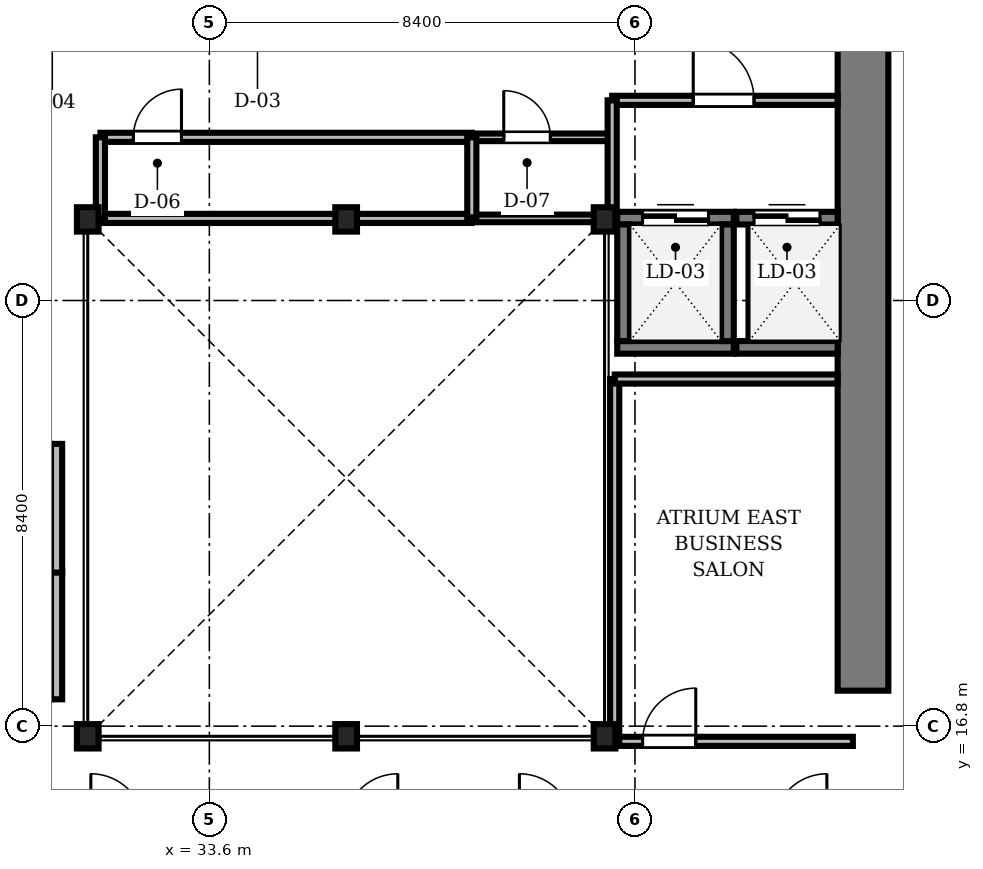
"""IFC4 building model, lengths in metres.
Left out: names, types, materials, properties, quantities, classifications, styles, units other than length and angle.
Written with IfcOpenShell. Run it as: python <this file> out.ifc"""

import sys

from ifc_helpers import new_model, si_unit, direction, frame, frame_2d, origin, origin_2d, place, context, subcontext, project, spatial, rectangle, i_section, extrude, source, transform, mapped, element, fill, save


model = new_model("IFC4")
c1 = context("Model", 3, precision=1e-05, world=origin(), true_north=direction((0.0, 1.0)))
c2 = subcontext(c1, "Body", "Model", "MODEL_VIEW")
j1 = project(units=[si_unit("LENGTHUNIT", "METRE"), si_unit("PLANEANGLEUNIT", "RADIAN")], contexts=[c1])
p1 = place(None, origin())
s1 = spatial("IfcSite", under=j1, at=p1, CompositionType="ELEMENT")
p2 = place(p1, origin())
s2 = spatial("IfcBuilding", under=s1, at=p2, CompositionType="ELEMENT")
p3 = place(p2, frame((0.0, 0.0, 82.35)))
s3 = spatial("IfcBuildingStorey", under=s2, at=p3, CompositionType="ELEMENT", Elevation=82.35)
m1 = source(origin(), c2, "Body", "SweptSolid", [
    extrude(rectangle(XDim=13.15, YDim=1.0, at=frame_2d((6.575, 0.0))), origin(), (0.0, 0.0, 1.0), 3.41),
])
p4 = place(p3, frame((46.5, 17.5, 0.0), z_axis=(0.0, 0.0, 1.0), x_axis=(0.0, 1.0, 0.0)))
e1 = element("IfcWall", 1, at=p4, inside=s3, PredefinedType="SHEAR", context=c2, shape_type="MappedRepresentation", body=[
    mapped(m1, transform((0.0, 0.0, 0.0), scale=1.0)),
])
m2 = source(origin(), c2, "Body", "SweptSolid", [
    extrude(i_section(OverallWidth=0.428, OverallDepth=0.481, WebThickness=0.04, FlangeThickness=0.063, FilletRadius=0.015, at=origin_2d()), origin(), (0.0, 0.0, 1.0), 3.41),
])
for number, where, z_axis, x_axis in (
    (2, (31.2, 16.6, 0.0), (0.0, 0.0, 1.0), (1.0, 0.0, 0.0)),
    (3, (36.3, 16.6, 0.0), (0.0, 0.0, 1.0), (1.0, 0.0, 0.0)),
    (4, (41.4, 16.6, 0.0), (0.0, 0.0, 1.0), (1.0, 0.0, 0.0)),
    (5, (41.4, 26.8, 0.0), (0.0, 0.0, 1.0), (1.0, 0.0, 0.0)),
    (6, (36.3, 26.8, 0.0), (0.0, 0.0, 1.0), (1.0, 0.0, 0.0)),
    (7, (31.2, 26.8, 0.0), (0.0, 0.0, 1.0), (1.0, 0.0, 0.0)),
):
    element("IfcColumn", number, at=place(p3, frame(where, z_axis=z_axis, x_axis=x_axis)), inside=s3, PredefinedType="COLUMN", context=c2, shape_type="MappedRepresentation", body=[
        mapped(m2, transform((0.0, 0.0, 0.0), scale=1.0)),
    ])
m3 = source(origin(), c2, "Body", "SweptSolid", [
    extrude(rectangle(XDim=2.54, YDim=0.22, at=frame_2d((1.27, 0.0))), origin(), (0.0, 0.0, 1.0), 3.41),
])
for number, where, z_axis, x_axis in (
    (8, (30.585, 17.33, 0.0), (0.0, 0.0, 1.0), (0.0, 1.0, 0.0)),
    (9, (30.585, 19.83, 0.0), (0.0, 0.0, 1.0), (0.0, 1.0, 0.0)),
):
    element("IfcWall", number, at=place(p3, frame(where, z_axis=z_axis, x_axis=x_axis)), inside=s3, PredefinedType="SOLIDWALL", context=c2, shape_type="MappedRepresentation", body=[
        mapped(m3, transform((0.0, 0.0, 0.0), scale=1.0)),
    ])
m4 = source(origin(), c2, "Body", "SweptSolid", [
    extrude(rectangle(XDim=2.3, YDim=0.25, at=frame_2d((1.15, 0.0))), origin(), (0.0, 0.0, 1.0), 3.41),
])
p5 = place(p3, frame((41.65, 24.275, 0.0), z_axis=(0.0, 0.0, 1.0), x_axis=(1.0, 0.0, 0.0)))
e10 = element("IfcWall", 10, at=p5, inside=s3, PredefinedType="SOLIDWALL", context=c2, shape_type="MappedRepresentation", body=[
    mapped(m4, transform((0.0, 0.0, 0.0), scale=1.0)),
])
p6 = place(p3, frame((41.65, 26.825, 0.0), z_axis=(0.0, 0.0, 1.0), x_axis=(1.0, 0.0, 0.0)))
e11 = element("IfcWall", 11, at=p6, inside=s3, PredefinedType="SOLIDWALL", context=c2, shape_type="MappedRepresentation", body=[
    mapped(m4, transform((0.0, 0.0, 0.0), scale=1.0)),
])
m5 = source(origin(), c2, "Body", "SweptSolid", [
    extrude(rectangle(XDim=1.3, YDim=2.3, at=frame_2d((0.65, 1.15))), frame((0.0, 0.135, 0.0), z_axis=(0.0, -1.0, 0.0), x_axis=(1.0, 0.0, 0.0)), (0.0, 0.0, 1.0), 0.27),
])
p7 = place(p6, frame((0.5, 0.0, 0.0)))
e12 = element("IfcOpeningElement", 12, at=p7, cuts=e11, PredefinedType="OPENING", context=c2, shape_type="MappedRepresentation", body=[
    mapped(m5, transform((0.0, 0.0, 0.0), scale=1.0)),
])
for number, where, z_axis, x_axis in (
    (13, (41.775, 24.4, 0.0), (0.0, 0.0, 1.0), (0.0, 1.0, 0.0)),
    (14, (43.825, 24.4, 0.0), (0.0, 0.0, 1.0), (0.0, 1.0, 0.0)),
):
    element("IfcWall", number, at=place(p3, frame(where, z_axis=z_axis, x_axis=x_axis)), inside=s3, PredefinedType="SOLIDWALL", context=c2, shape_type="MappedRepresentation", body=[
        mapped(m4, transform((0.0, 0.0, 0.0), scale=1.0)),
    ])
m6 = source(origin(), c2, "Body", "SweptSolid", [
    extrude(rectangle(XDim=2.0, YDim=0.25, at=frame_2d((1.0, 0.0))), origin(), (0.0, 0.0, 1.0), 3.41),
])
p8 = place(p3, frame((44.0, 24.275, 0.0), z_axis=(0.0, 0.0, 1.0), x_axis=(1.0, 0.0, 0.0)))
e15 = element("IfcWall", 15, at=p8, inside=s3, PredefinedType="SOLIDWALL", context=c2, shape_type="MappedRepresentation", body=[
    mapped(m6, transform((0.0, 0.0, 0.0), scale=1.0)),
])
p9 = place(p3, frame((44.0, 26.825, 0.0), z_axis=(0.0, 0.0, 1.0), x_axis=(1.0, 0.0, 0.0)))
e16 = element("IfcWall", 16, at=p9, inside=s3, PredefinedType="SOLIDWALL", context=c2, shape_type="MappedRepresentation", body=[
    mapped(m6, transform((0.0, 0.0, 0.0), scale=1.0)),
])
p10 = place(p9, frame((0.35, 0.0, 0.0)))
e17 = element("IfcOpeningElement", 17, at=p10, cuts=e16, PredefinedType="OPENING", context=c2, shape_type="MappedRepresentation", body=[
    mapped(m5, transform((0.0, 0.0, 0.0), scale=1.0)),
])
m7 = source(origin(), c2, "Body", "SweptSolid", [
    extrude(rectangle(XDim=7.33, YDim=0.18, at=frame_2d((3.665, 0.0))), origin(), (0.0, 0.0, 1.0), 3.042),
])
p11 = place(p3, frame((31.45, 28.42, 0.0), z_axis=(0.0, 0.0, 1.0), x_axis=(1.0, 0.0, 0.0)))
e18 = element("IfcWall", 18, at=p11, inside=s3, PredefinedType="PARTITIONING", context=c2, shape_type="MappedRepresentation", body=[
    mapped(m7, transform((0.0, 0.0, 0.0), scale=1.0)),
])
m8 = source(origin(), c2, "Body", "SweptSolid", [
    extrude(rectangle(XDim=0.95, YDim=2.15, at=frame_2d((0.475, 1.075))), frame((0.0, 0.1, 0.0), z_axis=(0.0, -1.0, 0.0), x_axis=(1.0, 0.0, 0.0)), (0.0, 0.0, 1.0), 0.2),
])
p12 = place(p11, frame((0.65, 0.0, 0.0)))
e19 = element("IfcOpeningElement", 19, at=p12, cuts=e18, PredefinedType="OPENING", context=c2, shape_type="MappedRepresentation", body=[
    mapped(m8, transform((0.0, 0.0, 0.0), scale=1.0)),
])
m9 = source(origin(), c2, "Body", "SweptSolid", [
    extrude(rectangle(XDim=4.448, YDim=0.18, at=frame_2d((2.224, 0.0))), origin(), (0.0, 0.0, 1.0), 3.042),
])
p13 = place(p3, frame((41.55, 29.15, 0.0), z_axis=(0.0, 0.0, 1.0), x_axis=(1.0, 0.0, 0.0)))
e20 = element("IfcWall", 20, at=p13, inside=s3, PredefinedType="PARTITIONING", context=c2, shape_type="MappedRepresentation", body=[
    mapped(m9, transform((0.0, 0.0, 0.0), scale=1.0)),
])
m10 = source(origin(), c2, "Body", "SweptSolid", [
    extrude(rectangle(XDim=1.2, YDim=2.2, at=frame_2d((0.6, 1.1))), frame((0.0, 0.1, 0.0), z_axis=(0.0, -1.0, 0.0), x_axis=(1.0, 0.0, 0.0)), (0.0, 0.0, 1.0), 0.2),
])
p14 = place(p13, frame((1.6, 0.0, 0.0)))
e21 = element("IfcOpeningElement", 21, at=p14, cuts=e20, PredefinedType="OPENING", context=c2, shape_type="MappedRepresentation", body=[
    mapped(m10, transform((0.0, 0.0, 0.0), scale=1.0)),
])
m11 = source(origin(), c2, "Body", "SweptSolid", [
    extrude(rectangle(XDim=4.7, YDim=0.18, at=frame_2d((2.35, 0.0))), origin(), (0.0, 0.0, 1.0), 2.802),
])
p15 = place(p3, frame((41.6, 16.5, 0.0), z_axis=(0.0, 0.0, 1.0), x_axis=(1.0, 0.0, 0.0)))
e22 = element("IfcWall", 22, at=p15, inside=s3, PredefinedType="PARTITIONING", context=c2, shape_type="MappedRepresentation", body=[
    mapped(m11, transform((0.0, 0.0, 0.0), scale=1.0)),
])
m12 = source(origin(), c2, "Body", "SweptSolid", [
    extrude(rectangle(XDim=1.05, YDim=2.2, at=frame_2d((0.525, 1.1))), frame((0.0, 0.1, 0.0), z_axis=(0.0, -1.0, 0.0), x_axis=(1.0, 0.0, 0.0)), (0.0, 0.0, 1.0), 0.2),
])
p16 = place(p15, frame((0.55, 0.0, 0.0)))
e23 = element("IfcOpeningElement", 23, at=p16, cuts=e22, PredefinedType="OPENING", context=c2, shape_type="MappedRepresentation", body=[
    mapped(m12, transform((0.0, 0.0, 0.0), scale=1.0)),
])
m13 = source(origin(), c2, "Body", "SweptSolid", [
    extrude(rectangle(XDim=2.74, YDim=0.15, at=frame_2d((1.37, 0.0))), origin(), (0.0, 0.0, 1.0), 3.41),
])
p17 = place(p3, frame((38.78, 28.42, 0.0), z_axis=(0.0, 0.0, 1.0), x_axis=(1.0, 0.0, 0.0)))
e24 = element("IfcWall", 24, at=p17, inside=s3, PredefinedType="PARTITIONING", context=c2, shape_type="MappedRepresentation", body=[
    mapped(m13, transform((0.0, 0.0, 0.0), scale=1.0)),
])
m14 = source(origin(), c2, "Body", "SweptSolid", [
    extrude(rectangle(XDim=0.92, YDim=2.1, at=frame_2d((0.46, 1.05))), frame((0.0, 0.085, 0.0), z_axis=(0.0, -1.0, 0.0), x_axis=(1.0, 0.0, 0.0)), (0.0, 0.0, 1.0), 0.17),
])
p18 = place(p17, frame((0.63, 0.0, 0.0)))
e25 = element("IfcOpeningElement", 25, at=p18, cuts=e24, PredefinedType="OPENING", context=c2, shape_type="MappedRepresentation", body=[
    mapped(m14, transform((0.0, 0.0, 0.0), scale=1.0)),
])
m15 = source(origin(), c2, "Body", "SweptSolid", [
    extrude(rectangle(XDim=7.33, YDim=0.18, at=frame_2d((3.665, 0.0))), origin(), (0.0, 0.0, 1.0), 2.952),
])
p19 = place(p3, frame((31.45, 26.82, 0.0), z_axis=(0.0, 0.0, 1.0), x_axis=(1.0, 0.0, 0.0)))
e26 = element("IfcWall", 26, at=p19, inside=s3, PredefinedType="PARTITIONING", context=c2, shape_type="MappedRepresentation", body=[
    mapped(m15, transform((0.0, 0.0, 0.0), scale=1.0)),
])
m16 = source(origin(), c2, "Body", "SweptSolid", [
    extrude(rectangle(XDim=7.15, YDim=0.18, at=frame_2d((3.575, 0.0))), origin(), (0.0, 0.0, 1.0), 2.802),
])
p20 = place(p3, frame((41.6, 16.5, 0.0), z_axis=(0.0, 0.0, 1.0), x_axis=(0.0, 1.0, 0.0)))
e27 = element("IfcWall", 27, at=p20, inside=s3, PredefinedType="PARTITIONING", context=c2, shape_type="MappedRepresentation", body=[
    mapped(m16, transform((0.0, 0.0, 0.0), scale=1.0)),
])
m17 = source(origin(), c2, "Body", "SweptSolid", [
    extrude(rectangle(XDim=4.398, YDim=0.18, at=frame_2d((2.199, 0.0))), origin(), (0.0, 0.0, 1.0), 3.41),
])
p21 = place(p3, frame((41.6, 23.65, 0.0), z_axis=(0.0, 0.0, 1.0), x_axis=(1.0, 0.0, 0.0)))
e28 = element("IfcWall", 28, at=p21, inside=s3, PredefinedType="PARTITIONING", context=c2, shape_type="MappedRepresentation", body=[
    mapped(m17, transform((0.0, 0.0, 0.0), scale=1.0)),
])
m18 = source(origin(), c2, "Body", "SweptSolid", [
    extrude(rectangle(XDim=2.74, YDim=0.15, at=frame_2d((1.37, 0.0))), origin(), (0.0, 0.0, 1.0), 2.802),
])
p22 = place(p3, frame((38.78, 26.82, 0.0), z_axis=(0.0, 0.0, 1.0), x_axis=(1.0, 0.0, 0.0)))
e29 = element("IfcWall", 29, at=p22, inside=s3, PredefinedType="PARTITIONING", context=c2, shape_type="MappedRepresentation", body=[
    mapped(m18, transform((0.0, 0.0, 0.0), scale=1.0)),
])
m19 = source(origin(), c2, "Body", "SweptSolid", [
    extrude(rectangle(XDim=2.35, YDim=0.18, at=frame_2d((1.175, 0.0))), origin(), (0.0, 0.0, 1.0), 2.802),
])
p23 = place(p3, frame((41.55, 26.8, 0.0), z_axis=(0.0, 0.0, 1.0), x_axis=(0.0, 1.0, 0.0)))
e30 = element("IfcWall", 30, at=p23, inside=s3, PredefinedType="PARTITIONING", context=c2, shape_type="MappedRepresentation", body=[
    mapped(m19, transform((0.0, 0.0, 0.0), scale=1.0)),
])
m20 = source(origin(), c2, "Body", "SweptSolid", [
    extrude(rectangle(XDim=1.6, YDim=0.18, at=frame_2d((0.8, 0.0))), origin(), (0.0, 0.0, 1.0), 2.952),
])
for number, where, z_axis, x_axis in (
    (31, (31.45, 26.82, 0.0), (0.0, 0.0, 1.0), (0.0, 1.0, 0.0)),
    (32, (38.78, 26.82, 0.0), (0.0, 0.0, 1.0), (0.0, 1.0, 0.0)),
):
    element("IfcWall", number, at=place(p3, frame(where, z_axis=z_axis, x_axis=x_axis)), inside=s3, PredefinedType="PARTITIONING", context=c2, shape_type="MappedRepresentation", body=[
        mapped(m20, transform((0.0, 0.0, 0.0), scale=1.0)),
    ])
m21 = source(origin(), c2, "Body", "SweptSolid", [
    extrude(rectangle(XDim=1.3, YDim=2.3, at=frame_2d((0.65, 1.15))), frame((0.0, 0.025, 0.0), z_axis=(0.0, -1.0, 0.0), x_axis=(1.0, 0.0, 0.0)), (0.0, 0.0, 1.0), 0.05),
])
p24 = place(p7, origin())
e33 = element("IfcDoor", 33, at=p24, inside=s3, OperationType="DOUBLE_DOOR_SLIDING", PredefinedType="DOOR", context=c2, shape_type="MappedRepresentation", body=[
    mapped(m21, transform((0.0, 0.0, 0.0), scale=1.0)),
])
fill(e12, e33)
p25 = place(p10, origin())
e34 = element("IfcDoor", 34, at=p25, inside=s3, OperationType="DOUBLE_DOOR_SLIDING", PredefinedType="DOOR", context=c2, shape_type="MappedRepresentation", body=[
    mapped(m21, transform((0.0, 0.0, 0.0), scale=1.0)),
])
fill(e17, e34)
m22 = source(origin(), c2, "Body", "SweptSolid", [
    extrude(rectangle(XDim=0.95, YDim=2.15, at=frame_2d((0.475, 1.075))), frame((0.0, 0.025, 0.0), z_axis=(0.0, -1.0, 0.0), x_axis=(1.0, 0.0, 0.0)), (0.0, 0.0, 1.0), 0.05),
])
p26 = place(p12, origin())
e35 = element("IfcDoor", 35, at=p26, inside=s3, OperationType="SINGLE_SWING_RIGHT", PredefinedType="DOOR", context=c2, shape_type="MappedRepresentation", body=[
    mapped(m22, transform((0.0, 0.0, 0.0), scale=1.0)),
])
fill(e19, e35)
m23 = source(origin(), c2, "Body", "SweptSolid", [
    extrude(rectangle(XDim=1.2, YDim=2.2, at=frame_2d((0.6, 1.1))), frame((0.0, 0.025, 0.0), z_axis=(0.0, -1.0, 0.0), x_axis=(1.0, 0.0, 0.0)), (0.0, 0.0, 1.0), 0.05),
])
p27 = place(p14, origin())
e36 = element("IfcDoor", 36, at=p27, inside=s3, OperationType="SINGLE_SWING_LEFT", PredefinedType="DOOR", context=c2, shape_type="MappedRepresentation", body=[
    mapped(m23, transform((0.0, 0.0, 0.0), scale=1.0)),
])
fill(e21, e36)
m24 = source(origin(), c2, "Body", "SweptSolid", [
    extrude(rectangle(XDim=1.05, YDim=2.2, at=frame_2d((0.525, 1.1))), frame((0.0, 0.025, 0.0), z_axis=(0.0, -1.0, 0.0), x_axis=(1.0, 0.0, 0.0)), (0.0, 0.0, 1.0), 0.05),
])
p28 = place(p16, origin())
e37 = element("IfcDoor", 37, at=p28, inside=s3, OperationType="SINGLE_SWING_RIGHT", PredefinedType="DOOR", context=c2, shape_type="MappedRepresentation", body=[
    mapped(m24, transform((0.0, 0.0, 0.0), scale=1.0)),
])
fill(e23, e37)
m25 = source(origin(), c2, "Body", "SweptSolid", [
    extrude(rectangle(XDim=0.92, YDim=2.1, at=frame_2d((0.46, 1.05))), frame((0.0, 0.025, 0.0), z_axis=(0.0, -1.0, 0.0), x_axis=(1.0, 0.0, 0.0)), (0.0, 0.0, 1.0), 0.05),
])
p29 = place(p18, origin())
e38 = element("IfcDoor", 38, at=p29, inside=s3, OperationType="SINGLE_SWING_LEFT", PredefinedType="DOOR", context=c2, shape_type="MappedRepresentation", body=[
    mapped(m25, transform((0.0, 0.0, 0.0), scale=1.0)),
])
fill(e25, e38)
save(model, sys.argv[1])
